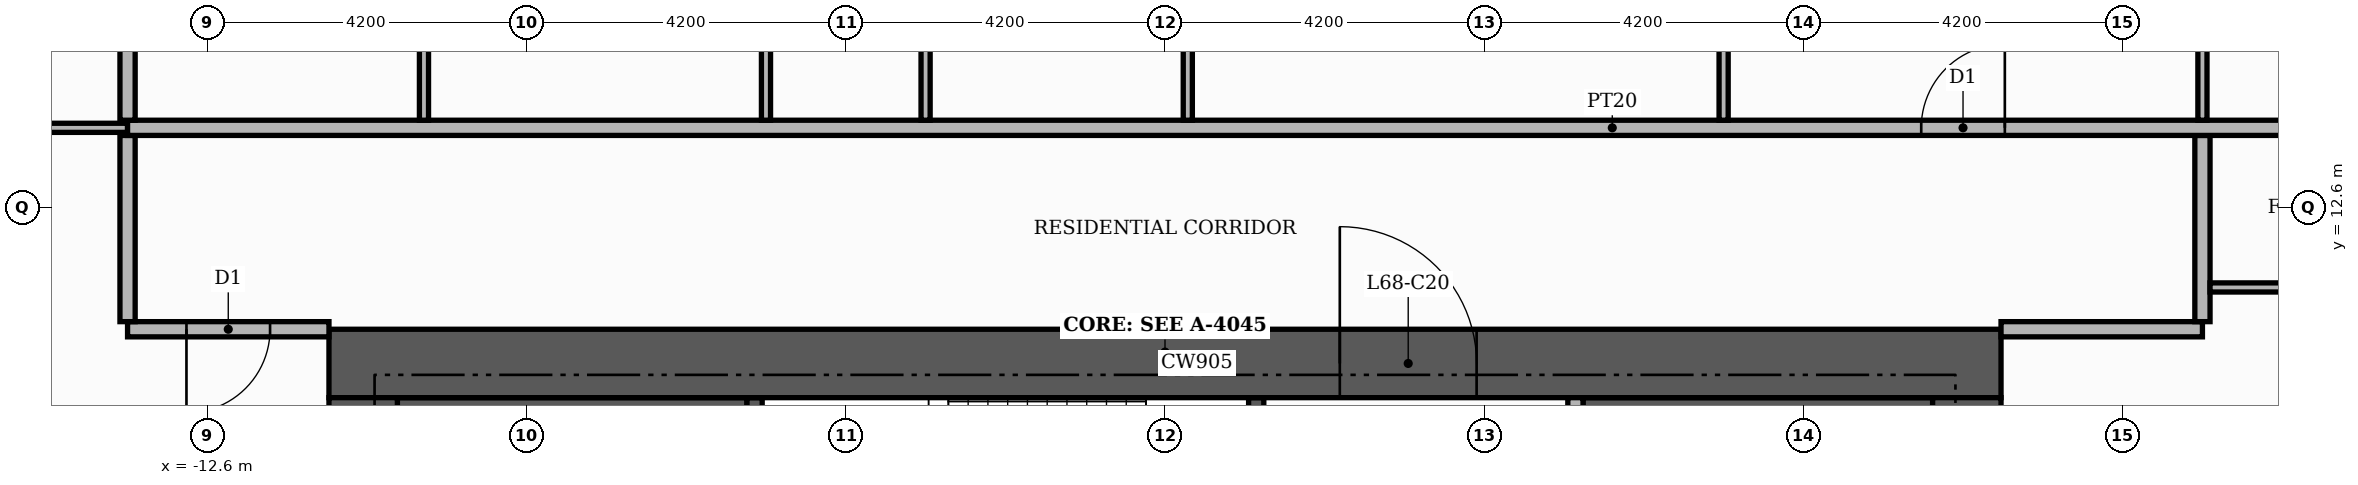
"""IFC4 building model, lengths in metres.
Left out: names, types, materials, properties, quantities, classifications, styles, units other than length and angle.
Written with IfcOpenShell. Run it as: python <this file> out.ifc"""

import sys

from ifc_helpers import new_model, si_unit, direction, frame, frame_2d, origin, place, context, subcontext, project, spatial, rectangle, extrude, element, fill, save


model = new_model("IFC4")
c1 = context("Model", 3, precision=1e-05, world=origin(), true_north=direction((0.0, 1.0)))
c2 = subcontext(c1, "Body", "Model", "MODEL_VIEW")
j1 = project(units=[si_unit("LENGTHUNIT", "METRE"), si_unit("PLANEANGLEUNIT", "RADIAN")], contexts=[c1])
p1 = place(None, origin())
s1 = spatial("IfcSite", under=j1, at=p1, CompositionType="ELEMENT")
p2 = place(p1, origin())
s2 = spatial("IfcBuilding", under=s1, at=p2, CompositionType="ELEMENT")
p3 = place(p2, frame((0.0, 0.0, 283.5)))
s3 = spatial("IfcBuildingStorey", under=s2, at=p3, CompositionType="ELEMENT", Elevation=283.5)
for number, where, z_axis, x_axis in (
    (1, (-10.1, 9.15, 0.0), (0.0, 0.0, 1.0), (1.0, 0.0, 0.0)),
    (2, (5.5, 9.15, 0.0), (0.0, 0.0, 1.0), (1.0, 0.0, 0.0)),
):
    element("IfcWall", number, at=place(p3, frame(where, z_axis=z_axis, x_axis=x_axis)), inside=s3, PredefinedType="SHEAR", context=c2, shape_type="SweptSolid", body=[
        extrude(rectangle(XDim=4.6, YDim=1.9, at=frame_2d((2.3, 0.0))), origin(), (0.0, 0.0, 1.0), 3.4),
    ])
p4 = place(p3, frame((-5.4, 7.25, 0.0), z_axis=(0.0, 0.0, 1.0), x_axis=(0.0, 1.0, 0.0)))
e3 = element("IfcWall", 3, at=p4, inside=s3, PredefinedType="SHEAR", context=c2, shape_type="SweptSolid", body=[
    extrude(rectangle(XDim=2.85, YDim=0.2, at=frame_2d((1.425, 0.0))), origin(), (0.0, 0.0, 1.0), 3.4),
])
p5 = place(p3, frame((1.2, 7.25, 0.0), z_axis=(0.0, 0.0, 1.0), x_axis=(0.0, 1.0, 0.0)))
e4 = element("IfcWall", 4, at=p5, inside=s3, PredefinedType="SHEAR", context=c2, shape_type="SweptSolid", body=[
    extrude(rectangle(XDim=2.85, YDim=0.2, at=frame_2d((1.425, 0.0))), origin(), (0.0, 0.0, 1.0), 3.4),
])
p6 = place(p5, frame((0.85, 0.0, 0.0)))
e5 = element("IfcOpeningElement", 5, at=p6, cuts=e4, PredefinedType="OPENING", context=c2, shape_type="SweptSolid", body=[
    extrude(rectangle(XDim=1.0, YDim=2.1, at=frame_2d((0.5, 1.05))), frame((0.0, 0.11, 0.0), z_axis=(0.0, -1.0, 0.0), x_axis=(1.0, 0.0, 0.0)), (0.0, 0.0, 1.0), 0.22),
])
p7 = place(p3, frame((-11.0, 10.55, 0.0), z_axis=(0.0, 0.0, 1.0), x_axis=(1.0, 0.0, 0.0)))
e6 = element("IfcWall", 6, at=p7, inside=s3, PredefinedType="SHEAR", context=c2, shape_type="SweptSolid", body=[
    extrude(rectangle(XDim=22.0, YDim=0.9, at=frame_2d((11.0, 0.0))), origin(), (0.0, 0.0, 1.0), 3.4),
])
p8 = place(p7, frame((13.3, 0.0, 0.0)))
e7 = element("IfcOpeningElement", 7, at=p8, cuts=e6, PredefinedType="OPENING", context=c2, shape_type="SweptSolid", body=[
    extrude(rectangle(XDim=1.8, YDim=2.2, at=frame_2d((0.9, 1.1))), frame((0.0, 0.46, 0.0), z_axis=(0.0, -1.0, 0.0), x_axis=(1.0, 0.0, 0.0)), (0.0, 0.0, 1.0), 0.92),
])
for number, where, z_axis, x_axis in (
    (8, (-10.55, -10.1, 0.0), (0.0, 0.0, 1.0), (0.0, 1.0, 0.0)),
    (9, (10.55, -10.1, 0.0), (0.0, 0.0, 1.0), (0.0, 1.0, 0.0)),
):
    element("IfcWall", number, at=place(p3, frame(where, z_axis=z_axis, x_axis=x_axis)), inside=s3, PredefinedType="SHEAR", context=c2, shape_type="SweptSolid", body=[
        extrude(rectangle(XDim=20.2, YDim=0.9, at=frame_2d((10.1, 0.0))), origin(), (0.0, 0.0, 1.0), 3.4),
    ])
p9 = place(p3, frame((5.4, 5.5, 0.0), z_axis=(0.0, 0.0, 1.0), x_axis=(0.0, 1.0, 0.0)))
e10 = element("IfcWall", 10, at=p9, inside=s3, PredefinedType="PARTITIONING", context=c2, shape_type="SweptSolid", body=[
    extrude(rectangle(XDim=4.6, YDim=0.2, at=frame_2d((2.3, 0.0))), origin(), (0.0, 0.0, 1.0), 3.4),
])
p10 = place(p9, frame((0.25, 0.0, 0.0)))
e11 = element("IfcOpeningElement", 11, at=p10, cuts=e10, PredefinedType="OPENING", context=c2, shape_type="SweptSolid", body=[
    extrude(rectangle(XDim=1.0, YDim=2.1, at=frame_2d((0.5, 1.05))), frame((0.0, 0.11, 0.0), z_axis=(0.0, -1.0, 0.0), x_axis=(1.0, 0.0, 0.0)), (0.0, 0.0, 1.0), 0.22),
])
p11 = place(p3, frame((-13.65, 11.0, 0.0), z_axis=(0.0, 0.0, 1.0), x_axis=(1.0, 0.0, 0.0)))
e12 = element("IfcWall", 12, at=p11, inside=s3, PredefinedType="PARTITIONING", context=c2, shape_type="SweptSolid", body=[
    extrude(rectangle(XDim=2.65, YDim=0.2, at=frame_2d((1.325, 0.0))), origin(), (0.0, 0.0, 1.0), 3.4),
])
p12 = place(p11, frame((0.775, 0.0, 0.0)))
e13 = element("IfcOpeningElement", 13, at=p12, cuts=e12, PredefinedType="OPENING", context=c2, shape_type="SweptSolid", body=[
    extrude(rectangle(XDim=1.1, YDim=2.4, at=frame_2d((0.55, 1.2))), frame((0.0, 0.11, 0.0), z_axis=(0.0, -1.0, 0.0), x_axis=(1.0, 0.0, 0.0)), (0.0, 0.0, 1.0), 0.22),
])
p13 = place(p3, frame((11.0, 11.0, 0.0), z_axis=(0.0, 0.0, 1.0), x_axis=(1.0, 0.0, 0.0)))
e14 = element("IfcWall", 14, at=p13, inside=s3, PredefinedType="PARTITIONING", context=c2, shape_type="SweptSolid", body=[
    extrude(rectangle(XDim=2.65, YDim=0.2, at=frame_2d((1.325, 0.0))), origin(), (0.0, 0.0, 1.0), 3.4),
])
for number, where, z_axis, x_axis in (
    (15, (-13.65, 11.1, 0.0), (0.0, 0.0, 1.0), (0.0, 1.0, 0.0)),
    (16, (13.65, 11.1, 0.0), (0.0, 0.0, 1.0), (0.0, 1.0, 0.0)),
):
    element("IfcWall", number, at=place(p3, frame(where, z_axis=z_axis, x_axis=x_axis)), inside=s3, PredefinedType="PARTITIONING", context=c2, shape_type="SweptSolid", body=[
        extrude(rectangle(XDim=2.45, YDim=0.2, at=frame_2d((1.225, 0.0))), origin(), (0.0, 0.0, 1.0), 3.4),
    ])
p14 = place(p3, frame((13.75, 11.55, 0.0), z_axis=(0.0, 0.0, 1.0), x_axis=(1.0, 0.0, 0.0)))
e17 = element("IfcWall", 17, at=p14, inside=s3, PredefinedType="PARTITIONING", context=c2, shape_type="SweptSolid", body=[
    extrude(rectangle(XDim=5.17, YDim=0.12, at=frame_2d((2.585, 0.0))), origin(), (0.0, 0.0, 1.0), 3.4),
])
p15 = place(p3, frame((-19.82, 13.65, 0.0), z_axis=(0.0, 0.0, 1.0), x_axis=(1.0, 0.0, 0.0)))
e18 = element("IfcWall", 18, at=p15, inside=s3, PredefinedType="PARTITIONING", context=c2, shape_type="SweptSolid", body=[
    extrude(rectangle(XDim=6.17, YDim=0.12, at=frame_2d((3.085, 0.0))), origin(), (0.0, 0.0, 1.0), 3.4),
])
p16 = place(p15, frame((2.635, 0.0, 0.0)))
e19 = element("IfcOpeningElement", 19, at=p16, cuts=e18, PredefinedType="OPENING", context=c2, shape_type="SweptSolid", body=[
    extrude(rectangle(XDim=0.9, YDim=2.1, at=frame_2d((0.45, 1.05))), frame((0.0, 0.07, 0.0), z_axis=(0.0, -1.0, 0.0), x_axis=(1.0, 0.0, 0.0)), (0.0, 0.0, 1.0), 0.14),
])
p17 = place(p3, frame((-13.65, 13.65, 0.0), z_axis=(0.0, 0.0, 1.0), x_axis=(1.0, 0.0, 0.0)))
e20 = element("IfcWall", 20, at=p17, inside=s3, PredefinedType="PARTITIONING", context=c2, shape_type="SweptSolid", body=[
    extrude(rectangle(XDim=39.07, YDim=0.2, at=frame_2d((19.535, 0.0))), origin(), (0.0, 0.0, 1.0), 3.4),
])
p18 = place(p17, frame((23.6, 0.0, 0.0)))
e21 = element("IfcOpeningElement", 21, at=p18, cuts=e20, PredefinedType="OPENING", context=c2, shape_type="SweptSolid", body=[
    extrude(rectangle(XDim=1.1, YDim=2.4, at=frame_2d((0.55, 1.2))), frame((0.0, 0.11, 0.0), z_axis=(0.0, -1.0, 0.0), x_axis=(1.0, 0.0, 0.0)), (0.0, 0.0, 1.0), 0.22),
])
p19 = place(p3, frame((-13.65, 13.75, 0.0), z_axis=(0.0, 0.0, 1.0), x_axis=(0.0, 1.0, 0.0)))
e22 = element("IfcWall", 22, at=p19, inside=s3, PredefinedType="PARTITIONING", context=c2, shape_type="SweptSolid", body=[
    extrude(rectangle(XDim=11.67, YDim=0.2, at=frame_2d((5.835, 0.0))), origin(), (0.0, 0.0, 1.0), 3.4),
])
for number, where, z_axis, x_axis in (
    (23, (-9.75, 13.75, 0.0), (0.0, 0.0, 1.0), (0.0, 1.0, 0.0)),
    (24, (-5.25, 13.75, 0.0), (0.0, 0.0, 1.0), (0.0, 1.0, 0.0)),
    (25, (-3.15, 13.75, 0.0), (0.0, 0.0, 1.0), (0.0, 1.0, 0.0)),
    (26, (0.3, 13.75, 0.0), (0.0, 0.0, 1.0), (0.0, 1.0, 0.0)),
    (27, (7.35, 13.75, 0.0), (0.0, 0.0, 1.0), (0.0, 1.0, 0.0)),
):
    element("IfcWall", number, at=place(p3, frame(where, z_axis=z_axis, x_axis=x_axis)), inside=s3, PredefinedType="PARTITIONING", context=c2, shape_type="SweptSolid", body=[
        extrude(rectangle(XDim=4.81, YDim=0.12, at=frame_2d((2.405, 0.0))), origin(), (0.0, 0.0, 1.0), 3.4),
    ])
p20 = place(p3, frame((13.65, 13.75, 0.0), z_axis=(0.0, 0.0, 1.0), x_axis=(0.0, 1.0, 0.0)))
e28 = element("IfcWall", 28, at=p20, inside=s3, PredefinedType="PARTITIONING", context=c2, shape_type="SweptSolid", body=[
    extrude(rectangle(XDim=6.31, YDim=0.12, at=frame_2d((3.155, 0.0))), origin(), (0.0, 0.0, 1.0), 3.4),
])
p21 = place(p20, frame((2.685, 0.0, 0.0)))
e29 = element("IfcOpeningElement", 29, at=p21, cuts=e28, PredefinedType="OPENING", context=c2, shape_type="SweptSolid", body=[
    extrude(rectangle(XDim=0.9, YDim=2.1, at=frame_2d((0.45, 1.05))), frame((0.0, 0.07, 0.0), z_axis=(0.0, -1.0, 0.0), x_axis=(1.0, 0.0, 0.0)), (0.0, 0.0, 1.0), 0.14),
])
p22 = place(p8, origin())
e30 = element("IfcDoor", 30, at=p22, inside=s3, OperationType="DOUBLE_DOOR_SINGLE_SWING", PredefinedType="DOOR", context=c2, shape_type="SweptSolid", body=[
    extrude(rectangle(XDim=1.8, YDim=2.2, at=frame_2d((0.9, 1.1))), frame((0.0, 0.025, 0.0), z_axis=(0.0, -1.0, 0.0), x_axis=(1.0, 0.0, 0.0)), (0.0, 0.0, 1.0), 0.05),
])
fill(e7, e30)
p23 = place(p18, origin())
e31 = element("IfcDoor", 31, at=p23, inside=s3, OperationType="SINGLE_SWING_RIGHT", PredefinedType="DOOR", context=c2, shape_type="SweptSolid", body=[
    extrude(rectangle(XDim=1.1, YDim=2.4, at=frame_2d((0.55, 1.2))), frame((0.0, 0.025, 0.0), z_axis=(0.0, -1.0, 0.0), x_axis=(1.0, 0.0, 0.0)), (0.0, 0.0, 1.0), 0.05),
])
fill(e21, e31)
p24 = place(p12, frame((1.1, 0.0, 0.0), z_axis=(0.0, 0.0, 1.0), x_axis=(-1.0, 0.0, 0.0)))
e32 = element("IfcDoor", 32, at=p24, inside=s3, OperationType="SINGLE_SWING_LEFT", PredefinedType="DOOR", context=c2, shape_type="SweptSolid", body=[
    extrude(rectangle(XDim=1.1, YDim=2.4, at=frame_2d((0.55, 1.2))), frame((0.0, 0.025, 0.0), z_axis=(0.0, -1.0, 0.0), x_axis=(1.0, 0.0, 0.0)), (0.0, 0.0, 1.0), 0.05),
])
fill(e13, e32)
save(model, sys.argv[1])
